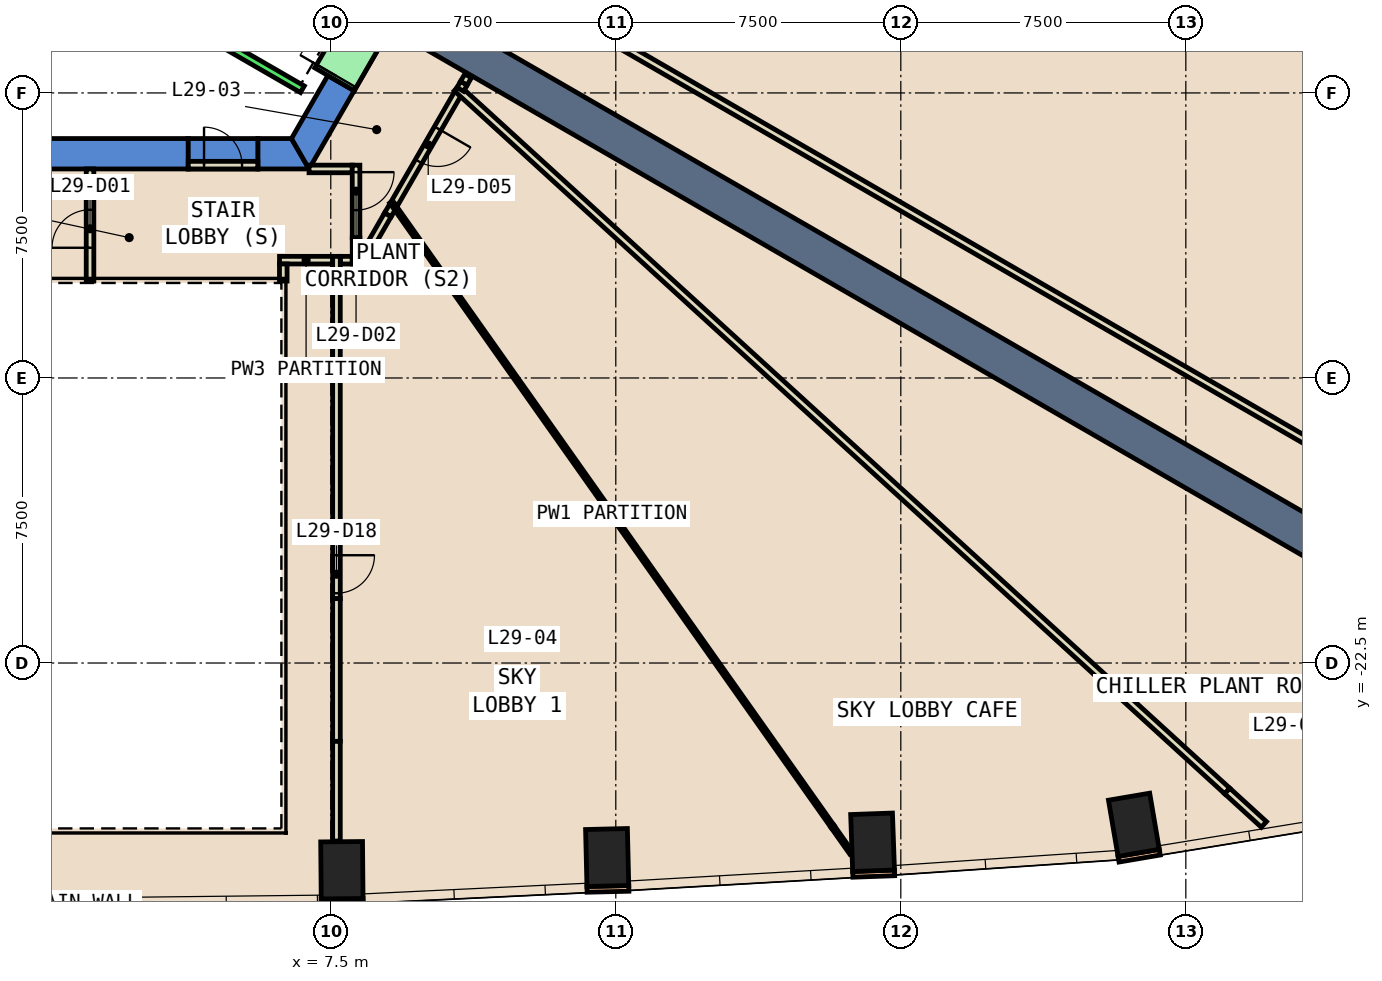
"""IFC4 building model, lengths in metres.
Left out: names, types, materials, properties, quantities, classifications, styles, units other than length and angle.
Written with IfcOpenShell. Run it as: python <this file> out.ifc"""

import sys

from ifc_helpers import new_model, si_unit, direction, frame, frame_2d, origin, origin_2d, place, context, subcontext, project, spatial, polyline, rectangle, outline, extrude, element, fill, save


model = new_model("IFC4")
c1 = context("Model", 3, precision=1e-05, world=origin(), true_north=direction((0.0, 1.0)))
c2 = subcontext(c1, "Body", "Model", "MODEL_VIEW")
j1 = project(units=[si_unit("LENGTHUNIT", "METRE"), si_unit("PLANEANGLEUNIT", "RADIAN")], contexts=[c1])
p1 = place(None, origin())
s1 = spatial("IfcSite", under=j1, at=p1, CompositionType="ELEMENT")
p2 = place(p1, origin())
s2 = spatial("IfcBuilding", under=s1, at=p2, CompositionType="ELEMENT")
p3 = place(p2, frame((0.0, 0.0, 132.8)))
s3 = spatial("IfcBuildingStorey", under=s2, at=p3, CompositionType="ELEMENT", Elevation=132.8)
for number, where, z_axis, x_axis in (
    (1, (7.792, -27.952, -0.6), (0.0, 0.0, 1.0), (1.0, 0.009, 0.0)),
    (2, (14.773, -27.618, -0.6), (0.0, 0.0, 1.0), (1.0, 0.024, 0.0)),
    (3, (21.757, -27.217, -0.6), (0.0, 0.0, 1.0), (0.999, 0.035, 0.0)),
    (4, (28.633, -26.757, -0.6), (0.0, 0.0, 1.0), (0.986, 0.168, 0.0)),
):
    element("IfcColumn", number, at=place(p3, frame(where, z_axis=z_axis, x_axis=x_axis)), inside=s3, PredefinedType="COLUMN", context=c2, shape_type="SweptSolid", body=[
        extrude(rectangle(XDim=1.1, YDim=1.5, at=origin_2d()), origin(), (0.0, 0.0, 1.0), 5.4),
    ])
p4 = place(p3, frame((0.0, 0.0, -0.6)))
e5 = element("IfcWall", 5, at=p4, inside=s3, PredefinedType="SHEAR", context=c2, shape_type="SweptSolid", body=[
    extrude(outline(polyline([(3.75, -9.5), (3.75, -8.7), (-6.466, -8.7), (-6.928, -9.5), (3.75, -9.5)])), origin(), (0.0, 0.0, 1.0), 5.4),
])
p5 = place(p3, frame((0.0, 0.0, -0.6)))
e6 = element("IfcWall", 6, at=p5, inside=s3, PredefinedType="SHEAR", context=c2, shape_type="SweptSolid", body=[
    extrude(outline(polyline([(5.58, -8.7), (5.58, -9.5), (6.928, -9.5), (6.466, -8.7), (5.58, -8.7)])), origin(), (0.0, 0.0, 1.0), 5.4),
])
p6 = place(p3, frame((0.0, 0.0, 3.6)))
e7 = element("IfcWall", 7, at=p6, inside=s3, PredefinedType="SHEAR", context=c2, shape_type="SweptSolid", body=[
    extrude(outline(polyline([(5.58, -9.5), (5.58, -8.7), (3.75, -8.7), (3.75, -9.5), (5.58, -9.5)])), origin(), (0.0, 0.0, 1.0), 1.2),
])
p7 = place(p3, frame((0.0, 0.0, -0.6)))
e8 = element("IfcWall", 8, at=p7, inside=s3, PredefinedType="SHEAR", context=c2, shape_type="SweptSolid", body=[
    extrude(outline(polyline([(8.117, -7.44), (7.424, -7.04), (6.466, -8.7), (6.928, -9.5), (8.117, -7.44)])), origin(), (0.0, 0.0, 1.0), 5.4),
])
p8 = place(p3, frame((0.0, 0.0, 3.6)))
e9 = element("IfcWall", 9, at=p8, inside=s3, PredefinedType="SHEAR", context=c2, shape_type="SweptSolid", body=[
    extrude(outline(polyline([(8.767, -6.314), (8.075, -5.914), (7.424, -7.04), (8.117, -7.44), (8.767, -6.314)])), origin(), (0.0, 0.0, 1.0), 1.2),
])
p9 = place(p3, frame((9.31, -5.375, 0.0), z_axis=(0.0, 0.0, 1.0), x_axis=(0.86602173752, -0.500006350103, 0.0)))
e10 = element("IfcWall", 10, at=p9, inside=s3, PredefinedType="SHEAR", context=c2, shape_type="SweptSolid", body=[
    extrude(rectangle(XDim=31.463, YDim=1.0, at=frame_2d((15.732, 0.0))), origin(), (0.0, 0.0, 1.0), 4.8),
])
p10 = place(p3, frame((7.249, -28.782, 0.0), z_axis=(0.0, 0.0, 1.0), x_axis=(0.99995860686, 0.009098602504, 0.0)))
e11 = element("IfcWall", 11, at=p10, inside=s3, PredefinedType="STANDARD", context=c2, shape_type="SweptSolid", body=[
    extrude(rectangle(XDim=1.1, YDim=0.15, at=frame_2d((0.55, 0.0))), origin(), (0.0, 0.0, 1.0), 4.8),
])
p11 = place(p3, frame((14.243, -28.456, 0.0), z_axis=(0.0, 0.0, 1.0), x_axis=(0.999718180159, 0.023739424163, 0.0)))
e12 = element("IfcWall", 12, at=p11, inside=s3, PredefinedType="STANDARD", context=c2, shape_type="SweptSolid", body=[
    extrude(rectangle(XDim=1.1, YDim=0.15, at=frame_2d((0.55, 0.0))), origin(), (0.0, 0.0, 1.0), 4.8),
])
p12 = place(p3, frame((21.237, -28.061, 0.0), z_axis=(0.0, 0.0, 1.0), x_axis=(0.999368780235, 0.035525217693, 0.0)))
e13 = element("IfcWall", 13, at=p12, inside=s3, PredefinedType="STANDARD", context=c2, shape_type="SweptSolid", body=[
    extrude(rectangle(XDim=1.1, YDim=0.15, at=frame_2d((0.55, 0.0))), origin(), (0.0, 0.0, 1.0), 4.8),
])
p13 = place(p3, frame((28.229, -27.663, 0.0), z_axis=(0.0, 0.0, 1.0), x_axis=(0.985763338892, 0.168138751323, 0.0)))
e14 = element("IfcWall", 14, at=p13, inside=s3, PredefinedType="STANDARD", context=c2, shape_type="SweptSolid", body=[
    extrude(rectangle(XDim=1.101, YDim=0.15, at=frame_2d((0.55, 0.0))), origin(), (0.0, 0.0, 1.0), 4.8),
])
p14 = place(p3, frame((1.165, -12.45, 0.0), z_axis=(0.0, 0.0, 1.0), x_axis=(0.0, 1.0, 0.0)))
e15 = element("IfcWall", 15, at=p14, inside=s3, PredefinedType="PARTITIONING", context=c2, shape_type="SweptSolid", body=[
    extrude(rectangle(XDim=2.95, YDim=0.2, at=frame_2d((1.475, 0.0))), origin(), (0.0, 0.0, 1.0), 4.8),
])
p15 = place(p14, frame((0.876, 0.0, 0.0)))
e16 = element("IfcOpeningElement", 16, at=p15, cuts=e15, PredefinedType="OPENING", context=c2, shape_type="SweptSolid", body=[
    extrude(rectangle(XDim=1.0, YDim=2.1, at=frame_2d((0.5, 1.05))), frame((0.0, 0.11, 0.0), z_axis=(0.0, -1.0, 0.0), x_axis=(1.0, 0.0, 0.0)), (0.0, 0.0, 1.0), 0.22),
])
p16 = place(p3, frame((7.55, -11.9, 0.0), z_axis=(0.0, 0.0, 1.0), x_axis=(-1.0, 0.0, 0.0)))
e17 = element("IfcWall", 17, at=p16, inside=s3, PredefinedType="PARTITIONING", context=c2, shape_type="SweptSolid", body=[
    extrude(rectangle(XDim=1.399, YDim=0.2, at=frame_2d((0.7, 0.0))), origin(), (0.0, 0.0, 1.0), 4.8),
])
p17 = place(p3, frame((6.25, -12.0, 0.0), z_axis=(0.0, 0.0, 1.0), x_axis=(0.0, -1.0, 0.0)))
e18 = element("IfcWall", 18, at=p17, inside=s3, PredefinedType="PARTITIONING", context=c2, shape_type="SweptSolid", body=[
    extrude(rectangle(XDim=0.45, YDim=0.2, at=frame_2d((0.225, 0.0))), origin(), (0.0, 0.0, 1.0), 4.8),
])
p18 = place(p3, frame((6.928, -9.5, 0.0), z_axis=(0.0, 0.0, 1.0), x_axis=(1.0, 0.0, 0.0)))
e19 = element("IfcWall", 19, at=p18, inside=s3, PredefinedType="PARTITIONING", context=c2, shape_type="SweptSolid", body=[
    extrude(rectangle(XDim=1.137, YDim=0.2, at=frame_2d((0.568, 0.0))), origin(), (0.0, 0.0, 1.0), 2.4),
])
p19 = place(p3, frame((8.165, -9.4, 0.0), z_axis=(0.0, 0.0, 1.0), x_axis=(0.0, -1.0, 0.0)))
e20 = element("IfcWall", 20, at=p19, inside=s3, PredefinedType="PARTITIONING", context=c2, shape_type="SweptSolid", body=[
    extrude(rectangle(XDim=1.914, YDim=0.2, at=frame_2d((0.957, 0.0))), origin(), (0.0, 0.0, 1.0), 2.4),
])
p20 = place(p19, frame((0.184, 0.0, 0.0)))
e21 = element("IfcOpeningElement", 21, at=p20, cuts=e20, PredefinedType="OPENING", context=c2, shape_type="SweptSolid", body=[
    extrude(rectangle(XDim=1.0, YDim=2.1, at=frame_2d((0.5, 1.05))), frame((0.0, 0.11, 0.0), z_axis=(0.0, -1.0, 0.0), x_axis=(1.0, 0.0, 0.0)), (0.0, 0.0, 1.0), 0.22),
])
p21 = place(p3, frame((8.065, -11.9, 0.0), z_axis=(0.0, 0.0, 1.0), x_axis=(-1.0, 0.0, 0.0)))
e22 = element("IfcWall", 22, at=p21, inside=s3, PredefinedType="PARTITIONING", context=c2, shape_type="SweptSolid", body=[
    extrude(rectangle(XDim=0.315, YDim=0.2, at=frame_2d((0.157, 0.0))), origin(), (0.0, 0.0, 1.0), 4.8),
])
p22 = place(p3, frame((7.65, -11.8, 0.0), z_axis=(0.0, 0.0, 1.0), x_axis=(0.0, -1.0, 0.0)))
e23 = element("IfcWall", 23, at=p22, inside=s3, PredefinedType="PARTITIONING", context=c2, shape_type="SweptSolid", body=[
    extrude(rectangle(XDim=9.006, YDim=0.2, at=frame_2d((4.503, 0.0))), origin(), (0.0, 0.0, 1.0), 4.8),
])
p23 = place(p22, frame((7.864, 0.0, 0.0)))
e24 = element("IfcOpeningElement", 24, at=p23, cuts=e23, PredefinedType="OPENING", context=c2, shape_type="SweptSolid", body=[
    extrude(rectangle(XDim=1.0, YDim=2.1, at=frame_2d((0.5, 1.05))), frame((0.0, 0.11, 0.0), z_axis=(0.0, -1.0, 0.0), x_axis=(1.0, 0.0, 0.0)), (0.0, 0.0, 1.0), 0.22),
])
p24 = place(p3, frame((9.145, -10.46, 0.0), z_axis=(0.0, 0.0, 1.0), x_axis=(-0.500701704226, -0.865619895442, 0.0)))
e25 = element("IfcWall", 25, at=p24, inside=s3, PredefinedType="PARTITIONING", context=c2, shape_type="SweptSolid", body=[
    extrude(rectangle(XDim=0.288, YDim=0.2, at=frame_2d((0.144, 0.0))), origin(), (0.0, 0.0, 1.0), 4.8),
])
p25 = place(p3, frame((10.89, -7.437, 0.0), z_axis=(0.0, 0.0, 1.0), x_axis=(-0.499905227862, -0.86608011359, 0.0)))
e26 = element("IfcWall", 26, at=p25, inside=s3, PredefinedType="PARTITIONING", context=c2, shape_type="SweptSolid", body=[
    extrude(rectangle(XDim=3.43, YDim=0.2, at=frame_2d((1.715, 0.0))), origin(), (0.0, 0.0, 1.0), 4.8),
])
p26 = place(p25, frame((1.152, 0.0, 0.0)))
e27 = element("IfcOpeningElement", 27, at=p26, cuts=e26, PredefinedType="OPENING", context=c2, shape_type="SweptSolid", body=[
    extrude(rectangle(XDim=1.0, YDim=2.1, at=frame_2d((0.5, 1.05))), frame((0.0, 0.11, 0.0), z_axis=(0.0, -1.0, 0.0), x_axis=(1.0, 0.0, 0.0)), (0.0, 0.0, 1.0), 0.22),
])
p27 = place(p3, frame((11.113, -7.051, 0.0), z_axis=(0.0, 0.0, 1.0), x_axis=(-0.499504513693, -0.866311284008, 0.0)))
e28 = element("IfcWall", 28, at=p27, inside=s3, PredefinedType="PARTITIONING", context=c2, shape_type="SweptSolid", body=[
    extrude(rectangle(XDim=0.226, YDim=0.2, at=frame_2d((0.113, 0.0))), origin(), (0.0, 0.0, 1.0), 2.1),
])
p28 = place(p3, frame((9.092, -10.37, 0.0), z_axis=(0.0, 0.0, 1.0), x_axis=(0.577122389033, -0.816657668841, 0.0)))
e29 = element("IfcWall", 29, at=p28, inside=s3, PredefinedType="PARTITIONING", context=c2, shape_type="SweptSolid", body=[
    extrude(rectangle(XDim=20.118, YDim=0.1, at=frame_2d((10.059, 0.0))), origin(), (0.0, 0.0, 1.0), 4.8),
])
p29 = place(p3, frame((10.816, -7.37, 0.0), z_axis=(0.0, 0.0, 1.0), x_axis=(0.738728492096, -0.674003126822, 0.0)))
e30 = element("IfcWall", 30, at=p29, inside=s3, PredefinedType="PARTITIONING", context=c2, shape_type="SweptSolid", body=[
    extrude(rectangle(XDim=27.445, YDim=0.2, at=frame_2d((13.722, 0.0))), origin(), (0.0, 0.0, 1.0), 4.8),
])
p30 = place(p3, frame((12.384, -4.65, 0.0), z_axis=(0.0, 0.0, 1.0), x_axis=(0.866033509011, -0.499985961072, 0.0)))
e31 = element("IfcWall", 31, at=p30, inside=s3, PredefinedType="PARTITIONING", context=c2, shape_type="SweptSolid", body=[
    extrude(rectangle(XDim=29.487, YDim=0.2, at=frame_2d((14.744, 0.0))), origin(), (0.0, 0.0, 1.0), 4.8),
])
p31 = place(p3, frame((3.75, -9.4, 0.0), z_axis=(0.0, 0.0, 1.0), x_axis=(1.0, 0.0, 0.0)))
e32 = element("IfcWall", 32, at=p31, inside=s3, PredefinedType="PARTITIONING", context=c2, shape_type="SweptSolid", body=[
    extrude(rectangle(XDim=1.83, YDim=0.2, at=frame_2d((0.915, 0.0))), origin(), (0.0, 0.0, 1.0), 2.4),
])
p32 = place(p31, frame((0.415, 0.0, 0.0)))
e33 = element("IfcOpeningElement", 33, at=p32, cuts=e32, PredefinedType="OPENING", context=c2, shape_type="SweptSolid", body=[
    extrude(rectangle(XDim=1.0, YDim=2.1, at=frame_2d((0.5, 1.05))), frame((0.0, 0.11, 0.0), z_axis=(0.0, -1.0, 0.0), x_axis=(1.0, 0.0, 0.0)), (0.0, 0.0, 1.0), 0.22),
])
p33 = place(p3, frame((8.165, -11.314, 0.0), z_axis=(0.0, 0.0, 1.0), x_axis=(0.0, -1.0, 0.0)))
e34 = element("IfcWall", 34, at=p33, inside=s3, PredefinedType="PARTITIONING", context=c2, shape_type="SweptSolid", body=[
    extrude(rectangle(XDim=0.686, YDim=0.2, at=frame_2d((0.343, 0.0))), origin(), (0.0, 0.0, 1.0), 4.8),
])
p34 = place(p3, frame((7.65, -20.806, 0.0), z_axis=(0.0, 0.0, 1.0), x_axis=(0.0, -1.0, 0.0)))
e35 = element("IfcWall", 35, at=p34, inside=s3, PredefinedType="PARTITIONING", context=c2, shape_type="SweptSolid", body=[
    extrude(rectangle(XDim=3.755, YDim=0.2, at=frame_2d((1.877, 0.0))), origin(), (0.0, 0.0, 1.0), 2.4),
])
p35 = place(p3, frame((7.65, -24.561, 0.0), z_axis=(0.0, 0.0, 1.0), x_axis=(0.0, -1.0, 0.0)))
e36 = element("IfcWall", 36, at=p35, inside=s3, PredefinedType="PARTITIONING", context=c2, shape_type="SweptSolid", body=[
    extrude(rectangle(XDim=2.622, YDim=0.2, at=frame_2d((1.311, 0.0))), origin(), (0.0, 0.0, 1.0), 4.8),
])
p36 = place(p3, frame((9.001, -10.709, 0.0), z_axis=(0.0, 0.0, 1.0), x_axis=(-0.499753940741, -0.866167419564, 0.0)))
e37 = element("IfcWall", 37, at=p36, inside=s3, PredefinedType="PARTITIONING", context=c2, shape_type="SweptSolid", body=[
    extrude(rectangle(XDim=1.119, YDim=0.2, at=frame_2d((0.559, 0.0))), origin(), (0.0, 0.0, 1.0), 2.4),
])
p37 = place(p3, frame((8.442, -11.678, 0.0), z_axis=(0.0, 0.0, 1.0), x_axis=(-0.499011179969, -0.866595547107, 0.0)))
e38 = element("IfcWall", 38, at=p37, inside=s3, PredefinedType="PARTITIONING", context=c2, shape_type="SweptSolid", body=[
    extrude(rectangle(XDim=0.357, YDim=0.2, at=frame_2d((0.178, 0.0))), origin(), (0.0, 0.0, 1.0), 4.8),
])
p38 = place(p3, frame((11.0, -7.247, 0.0), z_axis=(0.0, 0.0, 1.0), x_axis=(-0.498843983803, -0.866691802098, 0.0)))
e39 = element("IfcWall", 39, at=p38, inside=s3, PredefinedType="PARTITIONING", context=c2, shape_type="SweptSolid", body=[
    extrude(rectangle(XDim=0.185, YDim=0.2, at=frame_2d((0.092, 0.0))), origin(), (0.0, 0.0, 1.0), 4.8),
])
p39 = place(p3, frame((20.703, -26.8, 0.0), z_axis=(0.0, 0.0, 1.0), x_axis=(0.577265327721, -0.816556636989, 0.0)))
e40 = element("IfcWall", 40, at=p39, inside=s3, PredefinedType="PARTITIONING", context=c2, shape_type="SweptSolid", body=[
    extrude(rectangle(XDim=0.856, YDim=0.1, at=frame_2d((0.428, 0.0))), origin(), (0.0, 0.0, 1.0), 2.4),
])
p40 = place(p3, frame((31.09, -25.868, 0.0), z_axis=(0.0, 0.0, 1.0), x_axis=(0.738829774286, -0.673892101622, 0.0)))
e41 = element("IfcWall", 41, at=p40, inside=s3, PredefinedType="PARTITIONING", context=c2, shape_type="SweptSolid", body=[
    extrude(rectangle(XDim=1.305, YDim=0.2, at=frame_2d((0.652, 0.0))), origin(), (0.0, 0.0, 1.0), 2.1),
])
p41 = place(p3, frame((4.588, -6.153, 0.0), z_axis=(0.0, 0.0, 1.0), x_axis=(0.866022959057, -0.500004234368, 0.0)))
e42 = element("IfcWall", 42, at=p41, inside=s3, PredefinedType="STANDARD", context=c2, shape_type="SweptSolid", body=[
    extrude(rectangle(XDim=2.5, YDim=0.2, at=frame_2d((1.25, 0.0))), origin(), (0.0, 0.0, 1.0), 4.8),
])
p42 = place(p3, frame((7.598, -7.14, 0.0), z_axis=(0.0, 0.0, 1.0), x_axis=(0.500362116554, 0.865816234728, 0.0)))
e43 = element("IfcWall", 43, at=p42, inside=s3, PredefinedType="STANDARD", context=c2, shape_type="SweptSolid", body=[
    extrude(rectangle(XDim=1.299, YDim=1.2, at=frame_2d((0.65, 0.0))), origin(), (0.0, 0.0, 1.0), 2.4),
])
p43 = place(p42, frame((0.1, 0.0, 0.0)))
e44 = element("IfcOpeningElement", 44, at=p43, cuts=e43, PredefinedType="OPENING", context=c2, shape_type="SweptSolid", body=[
    extrude(rectangle(XDim=1.1, YDim=2.3, at=frame_2d((0.55, 1.15))), frame((0.0, 0.61, 0.0), z_axis=(0.0, -1.0, 0.0), x_axis=(1.0, 0.0, 0.0)), (0.0, 0.0, 1.0), 1.22),
])
p44 = place(p15, origin())
e45 = element("IfcDoor", 45, at=p44, inside=s3, OperationType="SINGLE_SWING_LEFT", PredefinedType="DOOR", context=c2, shape_type="SweptSolid", body=[
    extrude(rectangle(XDim=1.0, YDim=2.1, at=frame_2d((0.5, 1.05))), frame((0.0, 0.025, 0.0), z_axis=(0.0, -1.0, 0.0), x_axis=(1.0, 0.0, 0.0)), (0.0, 0.0, 1.0), 0.05),
])
fill(e16, e45)
p45 = place(p20, origin())
e46 = element("IfcDoor", 46, at=p45, inside=s3, OperationType="SINGLE_SWING_RIGHT", PredefinedType="DOOR", context=c2, shape_type="SweptSolid", body=[
    extrude(rectangle(XDim=1.0, YDim=2.1, at=frame_2d((0.5, 1.05))), frame((0.0, 0.025, 0.0), z_axis=(0.0, -1.0, 0.0), x_axis=(1.0, 0.0, 0.0)), (0.0, 0.0, 1.0), 0.05),
])
fill(e21, e46)
p46 = place(p26, origin())
e47 = element("IfcDoor", 47, at=p46, inside=s3, OperationType="SINGLE_SWING_LEFT", PredefinedType="DOOR", context=c2, shape_type="SweptSolid", body=[
    extrude(rectangle(XDim=1.0, YDim=2.1, at=frame_2d((0.5, 1.05))), frame((0.0, 0.025, 0.0), z_axis=(0.0, -1.0, 0.0), x_axis=(1.0, 0.0, 0.0)), (0.0, 0.0, 1.0), 0.05),
])
fill(e27, e47)
p47 = place(p23, origin())
e48 = element("IfcDoor", 48, at=p47, inside=s3, OperationType="SINGLE_SWING_RIGHT", PredefinedType="DOOR", context=c2, shape_type="SweptSolid", body=[
    extrude(rectangle(XDim=1.0, YDim=2.1, at=frame_2d((0.5, 1.05))), frame((0.0, 0.025, 0.0), z_axis=(0.0, -1.0, 0.0), x_axis=(1.0, 0.0, 0.0)), (0.0, 0.0, 1.0), 0.05),
])
fill(e24, e48)
p48 = place(p32, origin())
e49 = element("IfcDoor", 49, at=p48, inside=s3, OperationType="SINGLE_SWING_LEFT", PredefinedType="DOOR", context=c2, shape_type="SweptSolid", body=[
    extrude(rectangle(XDim=1.0, YDim=2.1, at=frame_2d((0.5, 1.05))), frame((0.0, 0.025, 0.0), z_axis=(0.0, -1.0, 0.0), x_axis=(1.0, 0.0, 0.0)), (0.0, 0.0, 1.0), 0.05),
])
fill(e33, e49)
p49 = place(p43, origin())
e50 = element("IfcDoor", 50, at=p49, inside=s3, OperationType="SLIDING_TO_LEFT", PredefinedType="DOOR", context=c2, shape_type="SweptSolid", body=[
    extrude(rectangle(XDim=1.1, YDim=2.3, at=frame_2d((0.55, 1.15))), frame((0.0, 0.025, 0.0), z_axis=(0.0, -1.0, 0.0), x_axis=(1.0, 0.0, 0.0)), (0.0, 0.0, 1.0), 0.05),
])
fill(e44, e50)
save(model, sys.argv[1])
